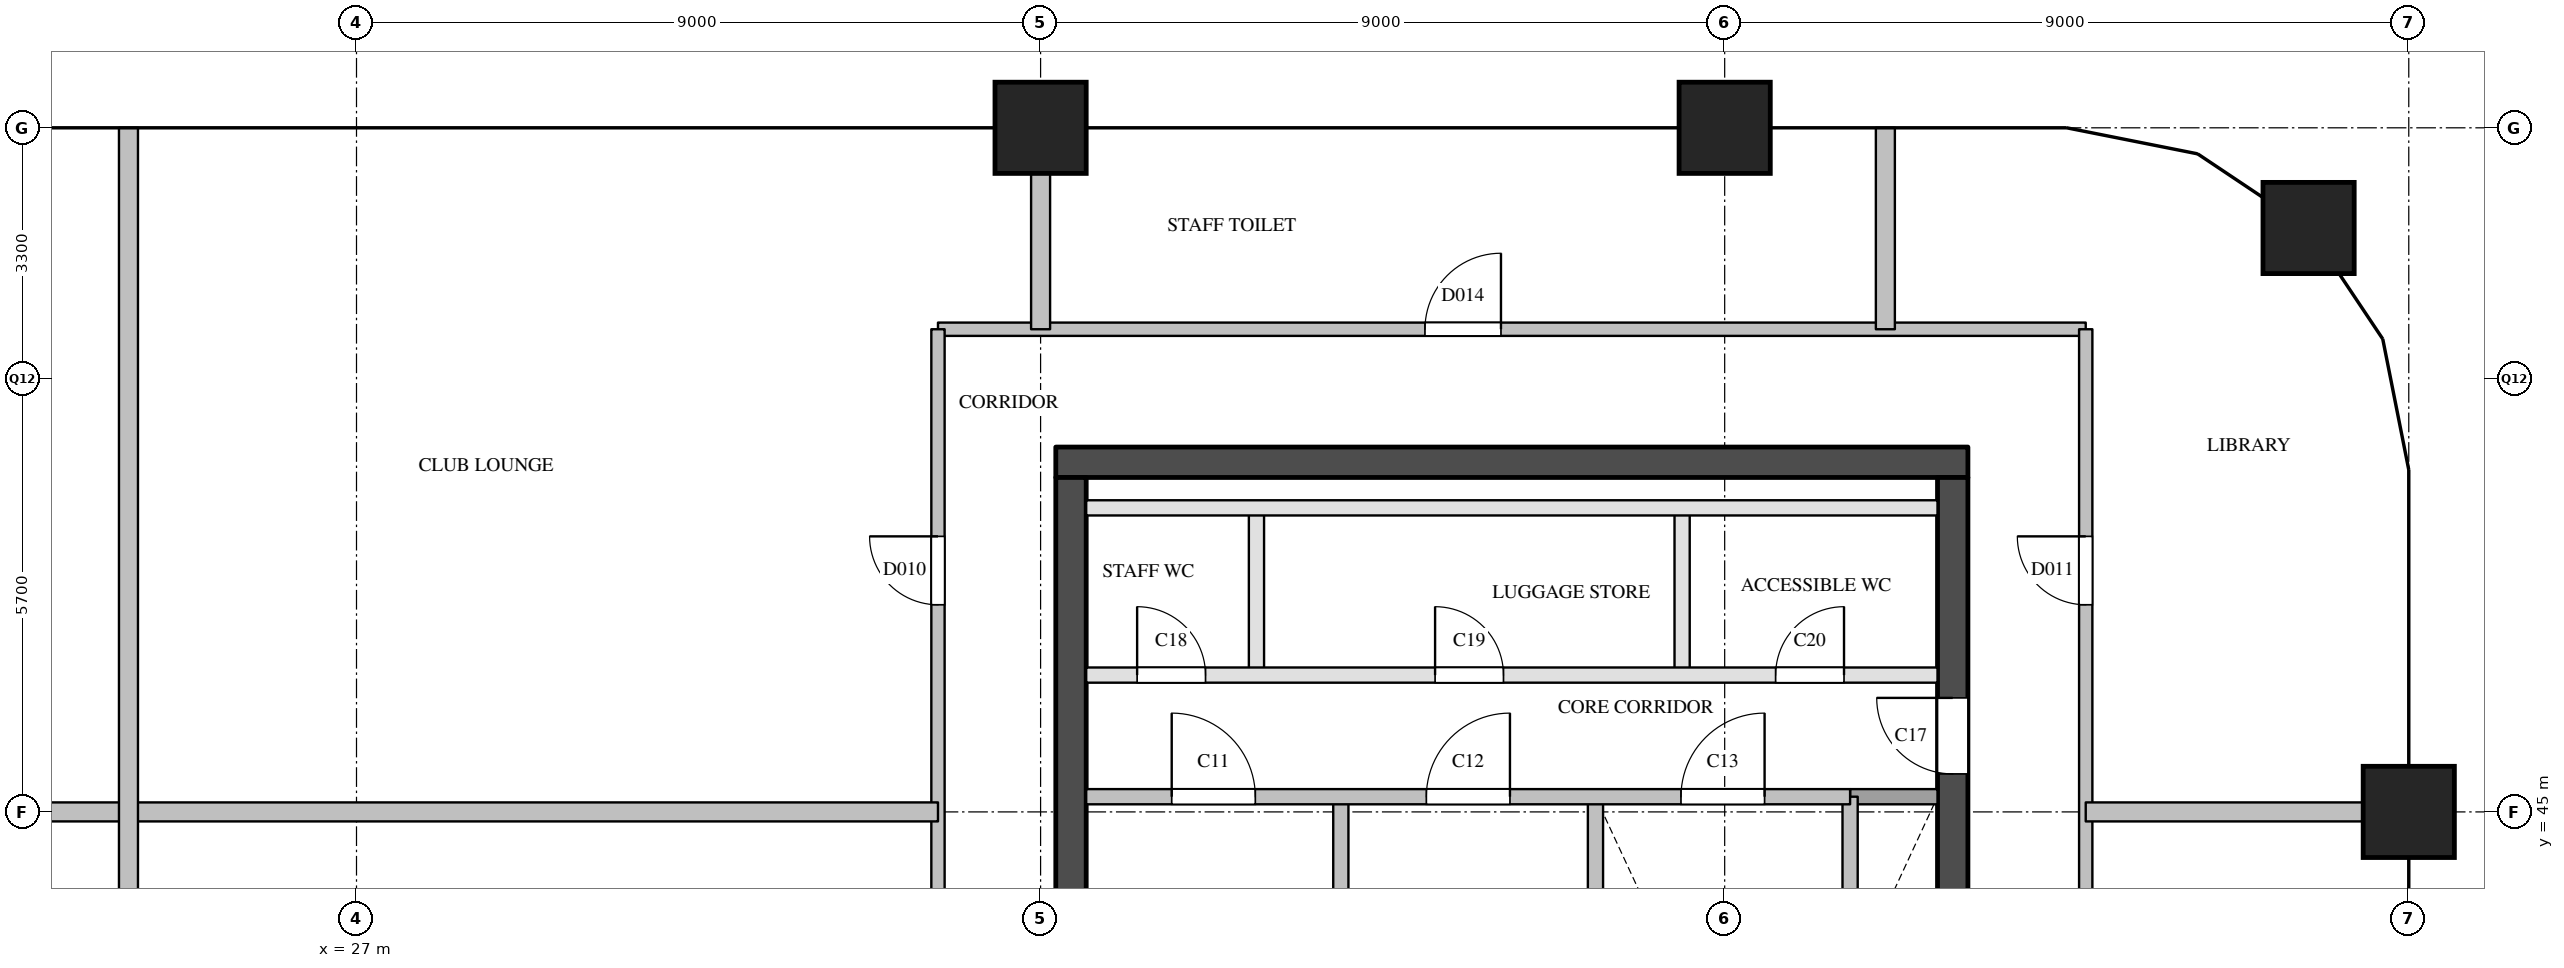
"""IFC4 building model, lengths in metres.
Left out: names, types, materials, properties, quantities, classifications, styles, units other than length and angle.
Written with IfcOpenShell. Run it as: python <this file> out.ifc"""

import sys

from ifc_helpers import new_model, si_unit, direction, frame, frame_2d, origin, origin_2d, place, context, subcontext, project, spatial, rectangle, extrude, element, fill, save


model = new_model("IFC4")
c1 = context("Model", 3, precision=1e-05, world=origin(), true_north=direction((0.0, 1.0)))
c2 = subcontext(c1, "Body", "Model", "MODEL_VIEW")
j1 = project(units=[si_unit("LENGTHUNIT", "METRE"), si_unit("PLANEANGLEUNIT", "RADIAN")], contexts=[c1])
p1 = place(None, origin())
s1 = spatial("IfcSite", under=j1, at=p1, CompositionType="ELEMENT")
p2 = place(p1, origin())
s2 = spatial("IfcBuilding", under=s1, at=p2, CompositionType="ELEMENT")
p3 = place(p2, frame((0.0, 0.0, 226.7)))
s3 = spatial("IfcBuildingStorey", under=s2, at=p3, CompositionType="ELEMENT", Elevation=226.7)
for number, where, z_axis, x_axis in (
    (1, (36.0, 54.0, 0.0), (0.0, 0.0, 1.0), (1.0, 0.0, 0.0)),
    (2, (45.0, 54.0, 0.0), (0.0, 0.0, 1.0), (1.0, 0.0, 0.0)),
    (3, (54.0, 45.0, 0.0), (0.0, 0.0, 1.0), (1.0, 0.0, 0.0)),
    (4, (52.682, 52.682, 0.0), (0.0, 0.0, 1.0), (1.0, 0.0, 0.0)),
):
    element("IfcColumn", number, at=place(p3, frame(where, z_axis=z_axis, x_axis=x_axis)), inside=s3, PredefinedType="COLUMN", context=c2, shape_type="SweptSolid", body=[
        extrude(rectangle(XDim=1.2, YDim=1.2, at=origin_2d()), origin(), (0.0, 0.0, 1.0), 3.9),
    ])
p4 = place(p3, frame((36.2, 49.6, 0.0), z_axis=(0.0, 0.0, 1.0), x_axis=(1.0, 0.0, 0.0)))
e5 = element("IfcWall", 5, at=p4, inside=s3, PredefinedType="SHEAR", context=c2, shape_type="SweptSolid", body=[
    extrude(rectangle(XDim=12.0, YDim=0.4, at=frame_2d((6.0, 0.0))), origin(), (0.0, 0.0, 1.0), 3.5),
])
p5 = place(p3, frame((36.4, 29.1, 0.0), z_axis=(0.0, 0.0, 1.0), x_axis=(0.0, 1.0, 0.0)))
e6 = element("IfcWall", 6, at=p5, inside=s3, PredefinedType="SHEAR", context=c2, shape_type="SweptSolid", body=[
    extrude(rectangle(XDim=20.3, YDim=0.4, at=frame_2d((10.15, 0.0))), origin(), (0.0, 0.0, 1.0), 3.5),
])
p6 = place(p5, frame((3.6, 0.0, 0.0)))
e7 = element("IfcOpeningElement", 7, at=p6, cuts=e6, PredefinedType="OPENING", context=c2, shape_type="SweptSolid", body=[
    extrude(rectangle(XDim=1.8, YDim=2.1, at=frame_2d((0.9, 1.05))), frame((0.0, 0.21, 0.0), z_axis=(0.0, -1.0, 0.0), x_axis=(1.0, 0.0, 0.0)), (0.0, 0.0, 1.0), 0.42),
])
p7 = place(p3, frame((48.0, 29.1, 0.0), z_axis=(0.0, 0.0, 1.0), x_axis=(0.0, 1.0, 0.0)))
e8 = element("IfcWall", 8, at=p7, inside=s3, PredefinedType="SHEAR", context=c2, shape_type="SweptSolid", body=[
    extrude(rectangle(XDim=20.3, YDim=0.4, at=frame_2d((10.15, 0.0))), origin(), (0.0, 0.0, 1.0), 3.5),
])
p8 = place(p7, frame((12.5, 0.0, 0.0)))
e9 = element("IfcOpeningElement", 9, at=p8, cuts=e8, PredefinedType="OPENING", context=c2, shape_type="SweptSolid", body=[
    extrude(rectangle(XDim=0.7, YDim=2.1, at=frame_2d((0.35, 1.05))), frame((0.0, 0.21, 0.0), z_axis=(0.0, -1.0, 0.0), x_axis=(1.0, 0.0, 0.0)), (0.0, 0.0, 1.0), 0.42),
])
p9 = place(p7, frame((3.9, 0.0, 0.0)))
e10 = element("IfcOpeningElement", 10, at=p9, cuts=e8, PredefinedType="OPENING", context=c2, shape_type="SweptSolid", body=[
    extrude(rectangle(XDim=1.8, YDim=2.1, at=frame_2d((0.9, 1.05))), frame((0.0, 0.21, 0.0), z_axis=(0.0, -1.0, 0.0), x_axis=(1.0, 0.0, 0.0)), (0.0, 0.0, 1.0), 0.42),
])
p10 = place(p7, frame((16.4, 0.0, 0.0)))
e11 = element("IfcOpeningElement", 11, at=p10, cuts=e8, PredefinedType="OPENING", context=c2, shape_type="SweptSolid", body=[
    extrude(rectangle(XDim=1.0, YDim=2.1, at=frame_2d((0.5, 1.05))), frame((0.0, 0.21, 0.0), z_axis=(0.0, -1.0, 0.0), x_axis=(1.0, 0.0, 0.0)), (0.0, 0.0, 1.0), 0.42),
])
p11 = place(p3, frame((38.84, 46.8, 0.0), z_axis=(0.0, 0.0, 1.0), x_axis=(0.0, 1.0, 0.0)))
e12 = element("IfcWall", 12, at=p11, inside=s3, PredefinedType="PARTITIONING", context=c2, shape_type="SweptSolid", body=[
    extrude(rectangle(XDim=2.2, YDim=0.2, at=frame_2d((1.1, 0.0))), origin(), (0.0, 0.0, 1.0), 3.5),
])
for number, where, z_axis, x_axis in (
    (13, (39.95, 40.78, 0.0), (0.0, 0.0, 1.0), (0.0, 1.0, 0.0)),
    (14, (43.3, 40.78, 0.0), (0.0, 0.0, 1.0), (0.0, 1.0, 0.0)),
):
    element("IfcWall", number, at=place(p3, frame(where, z_axis=z_axis, x_axis=x_axis)), inside=s3, PredefinedType="SOLIDWALL", context=c2, shape_type="SweptSolid", body=[
        extrude(rectangle(XDim=4.42, YDim=0.2, at=frame_2d((2.21, 0.0))), origin(), (0.0, 0.0, 1.0), 3.5),
    ])
p12 = place(p3, frame((44.44, 46.8, 0.0), z_axis=(0.0, 0.0, 1.0), x_axis=(0.0, 1.0, 0.0)))
e15 = element("IfcWall", 15, at=p12, inside=s3, PredefinedType="PARTITIONING", context=c2, shape_type="SweptSolid", body=[
    extrude(rectangle(XDim=2.2, YDim=0.2, at=frame_2d((1.1, 0.0))), origin(), (0.0, 0.0, 1.0), 3.5),
])
p13 = place(p3, frame((46.65, 40.78, 0.0), z_axis=(0.0, 0.0, 1.0), x_axis=(0.0, 1.0, 0.0)))
e16 = element("IfcWall", 16, at=p13, inside=s3, PredefinedType="SOLIDWALL", context=c2, shape_type="SweptSolid", body=[
    extrude(rectangle(XDim=4.42, YDim=0.2, at=frame_2d((2.21, 0.0))), origin(), (0.0, 0.0, 1.0), 3.5),
])
p14 = place(p3, frame((46.65, 45.2, 0.0), z_axis=(0.0, 0.0, 1.0), x_axis=(1.0, 0.0, 0.0)))
e17 = element("IfcWall", 17, at=p14, inside=s3, PredefinedType="SOLIDWALL", context=c2, shape_type="SweptSolid", body=[
    extrude(rectangle(XDim=1.15, YDim=0.2, at=frame_2d((0.575, 0.0))), origin(), (0.0, 0.0, 1.0), 3.5),
])
p15 = place(p3, frame((36.6, 45.2, 0.0), z_axis=(0.0, 0.0, 1.0), x_axis=(1.0, 0.0, 0.0)))
e18 = element("IfcWall", 18, at=p15, inside=s3, PredefinedType="SOLIDWALL", context=c2, shape_type="SweptSolid", body=[
    extrude(rectangle(XDim=10.05, YDim=0.2, at=frame_2d((5.025, 0.0))), origin(), (0.0, 0.0, 1.0), 3.5),
])
p16 = place(p15, frame((1.125, 0.0, 0.0)))
e19 = element("IfcOpeningElement", 19, at=p16, cuts=e18, PredefinedType="OPENING", context=c2, shape_type="SweptSolid", body=[
    extrude(rectangle(XDim=1.1, YDim=2.1, at=frame_2d((0.55, 1.05))), frame((0.0, 0.11, 0.0), z_axis=(0.0, -1.0, 0.0), x_axis=(1.0, 0.0, 0.0)), (0.0, 0.0, 1.0), 0.22),
])
p17 = place(p15, frame((4.475, 0.0, 0.0)))
e20 = element("IfcOpeningElement", 20, at=p17, cuts=e18, PredefinedType="OPENING", context=c2, shape_type="SweptSolid", body=[
    extrude(rectangle(XDim=1.1, YDim=2.1, at=frame_2d((0.55, 1.05))), frame((0.0, 0.11, 0.0), z_axis=(0.0, -1.0, 0.0), x_axis=(1.0, 0.0, 0.0)), (0.0, 0.0, 1.0), 0.22),
])
p18 = place(p15, frame((7.825, 0.0, 0.0)))
e21 = element("IfcOpeningElement", 21, at=p18, cuts=e18, PredefinedType="OPENING", context=c2, shape_type="SweptSolid", body=[
    extrude(rectangle(XDim=1.1, YDim=2.1, at=frame_2d((0.55, 1.05))), frame((0.0, 0.11, 0.0), z_axis=(0.0, -1.0, 0.0), x_axis=(1.0, 0.0, 0.0)), (0.0, 0.0, 1.0), 0.22),
])
p19 = place(p3, frame((36.6, 46.8, 0.0), z_axis=(0.0, 0.0, 1.0), x_axis=(1.0, 0.0, 0.0)))
e22 = element("IfcWall", 22, at=p19, inside=s3, PredefinedType="PARTITIONING", context=c2, shape_type="SweptSolid", body=[
    extrude(rectangle(XDim=11.2, YDim=0.2, at=frame_2d((5.6, 0.0))), origin(), (0.0, 0.0, 1.0), 3.5),
])
p20 = place(p19, frame((0.67, 0.0, 0.0)))
e23 = element("IfcOpeningElement", 23, at=p20, cuts=e22, PredefinedType="OPENING", context=c2, shape_type="SweptSolid", body=[
    extrude(rectangle(XDim=0.9, YDim=2.1, at=frame_2d((0.45, 1.05))), frame((0.0, 0.11, 0.0), z_axis=(0.0, -1.0, 0.0), x_axis=(1.0, 0.0, 0.0)), (0.0, 0.0, 1.0), 0.22),
])
p21 = place(p19, frame((4.59, 0.0, 0.0)))
e24 = element("IfcOpeningElement", 24, at=p21, cuts=e22, PredefinedType="OPENING", context=c2, shape_type="SweptSolid", body=[
    extrude(rectangle(XDim=0.9, YDim=2.1, at=frame_2d((0.45, 1.05))), frame((0.0, 0.11, 0.0), z_axis=(0.0, -1.0, 0.0), x_axis=(1.0, 0.0, 0.0)), (0.0, 0.0, 1.0), 0.22),
])
p22 = place(p19, frame((9.07, 0.0, 0.0)))
e25 = element("IfcOpeningElement", 25, at=p22, cuts=e22, PredefinedType="OPENING", context=c2, shape_type="SweptSolid", body=[
    extrude(rectangle(XDim=0.9, YDim=2.1, at=frame_2d((0.45, 1.05))), frame((0.0, 0.11, 0.0), z_axis=(0.0, -1.0, 0.0), x_axis=(1.0, 0.0, 0.0)), (0.0, 0.0, 1.0), 0.22),
])
p23 = place(p3, frame((36.6, 49.0, 0.0), z_axis=(0.0, 0.0, 1.0), x_axis=(1.0, 0.0, 0.0)))
e26 = element("IfcWall", 26, at=p23, inside=s3, PredefinedType="PARTITIONING", context=c2, shape_type="SweptSolid", body=[
    extrude(rectangle(XDim=11.2, YDim=0.2, at=frame_2d((5.6, 0.0))), origin(), (0.0, 0.0, 1.0), 3.5),
])
p24 = place(p3, frame((34.65, 51.35, 0.0), z_axis=(0.0, 0.0, 1.0), x_axis=(1.0, 0.0, 0.0)))
e27 = element("IfcWall", 27, at=p24, inside=s3, PredefinedType="PARTITIONING", context=c2, shape_type="SweptSolid", body=[
    extrude(rectangle(XDim=15.1, YDim=0.175, at=frame_2d((7.55, 0.0))), origin(), (0.0, 0.0, 1.0), 3.5),
])
p25 = place(p24, frame((6.407, 0.0, 0.0)))
e28 = element("IfcOpeningElement", 28, at=p25, cuts=e27, PredefinedType="OPENING", context=c2, shape_type="SweptSolid", body=[
    extrude(rectangle(XDim=1.0, YDim=2.1, at=frame_2d((0.5, 1.05))), frame((0.0, 0.097, 0.0), z_axis=(0.0, -1.0, 0.0), x_axis=(1.0, 0.0, 0.0)), (0.0, 0.0, 1.0), 0.195),
])
p26 = place(p3, frame((34.65, 28.5, 0.0), z_axis=(0.0, 0.0, 1.0), x_axis=(0.0, 1.0, 0.0)))
e29 = element("IfcWall", 29, at=p26, inside=s3, PredefinedType="PARTITIONING", context=c2, shape_type="SweptSolid", body=[
    extrude(rectangle(XDim=22.85, YDim=0.175, at=frame_2d((11.425, 0.0))), origin(), (0.0, 0.0, 1.0), 3.5),
])
p27 = place(p26, frame((3.3, 0.0, 0.0)))
e30 = element("IfcOpeningElement", 30, at=p27, cuts=e29, PredefinedType="OPENING", context=c2, shape_type="SweptSolid", body=[
    extrude(rectangle(XDim=0.9, YDim=2.1, at=frame_2d((0.45, 1.05))), frame((0.0, 0.097, 0.0), z_axis=(0.0, -1.0, 0.0), x_axis=(1.0, 0.0, 0.0)), (0.0, 0.0, 1.0), 0.195),
])
p28 = place(p26, frame((11.5, 0.0, 0.0)))
e31 = element("IfcOpeningElement", 31, at=p28, cuts=e29, PredefinedType="OPENING", context=c2, shape_type="SweptSolid", body=[
    extrude(rectangle(XDim=1.0, YDim=2.1, at=frame_2d((0.5, 1.05))), frame((0.0, 0.097, 0.0), z_axis=(0.0, -1.0, 0.0), x_axis=(1.0, 0.0, 0.0)), (0.0, 0.0, 1.0), 0.195),
])
p29 = place(p26, frame((19.225, 0.0, 0.0)))
e32 = element("IfcOpeningElement", 32, at=p29, cuts=e29, PredefinedType="OPENING", context=c2, shape_type="SweptSolid", body=[
    extrude(rectangle(XDim=0.9, YDim=2.1, at=frame_2d((0.45, 1.05))), frame((0.0, 0.097, 0.0), z_axis=(0.0, -1.0, 0.0), x_axis=(1.0, 0.0, 0.0)), (0.0, 0.0, 1.0), 0.195),
])
p30 = place(p3, frame((49.75, 28.5, 0.0), z_axis=(0.0, 0.0, 1.0), x_axis=(0.0, 1.0, 0.0)))
e33 = element("IfcWall", 33, at=p30, inside=s3, PredefinedType="PARTITIONING", context=c2, shape_type="SweptSolid", body=[
    extrude(rectangle(XDim=22.85, YDim=0.175, at=frame_2d((11.425, 0.0))), origin(), (0.0, 0.0, 1.0), 3.5),
])
p31 = place(p30, frame((3.3, 0.0, 0.0)))
e34 = element("IfcOpeningElement", 34, at=p31, cuts=e33, PredefinedType="OPENING", context=c2, shape_type="SweptSolid", body=[
    extrude(rectangle(XDim=0.9, YDim=2.1, at=frame_2d((0.45, 1.05))), frame((0.0, 0.097, 0.0), z_axis=(0.0, -1.0, 0.0), x_axis=(1.0, 0.0, 0.0)), (0.0, 0.0, 1.0), 0.195),
])
p32 = place(p30, frame((11.55, 0.0, 0.0)))
e35 = element("IfcOpeningElement", 35, at=p32, cuts=e33, PredefinedType="OPENING", context=c2, shape_type="SweptSolid", body=[
    extrude(rectangle(XDim=0.9, YDim=2.1, at=frame_2d((0.45, 1.05))), frame((0.0, 0.097, 0.0), z_axis=(0.0, -1.0, 0.0), x_axis=(1.0, 0.0, 0.0)), (0.0, 0.0, 1.0), 0.195),
])
p33 = place(p30, frame((19.225, 0.0, 0.0)))
e36 = element("IfcOpeningElement", 36, at=p33, cuts=e33, PredefinedType="OPENING", context=c2, shape_type="SweptSolid", body=[
    extrude(rectangle(XDim=0.9, YDim=2.1, at=frame_2d((0.45, 1.05))), frame((0.0, 0.097, 0.0), z_axis=(0.0, -1.0, 0.0), x_axis=(1.0, 0.0, 0.0)), (0.0, 0.0, 1.0), 0.195),
])
p34 = place(p3, frame((19.35, 45.0, 0.0), z_axis=(0.0, 0.0, 1.0), x_axis=(1.0, 0.0, 0.0)))
e37 = element("IfcWall", 37, at=p34, inside=s3, PredefinedType="PARTITIONING", context=c2, shape_type="SweptSolid", body=[
    extrude(rectangle(XDim=15.3, YDim=0.25, at=frame_2d((7.65, 0.0))), origin(), (0.0, 0.0, 1.0), 3.5),
])
p35 = place(p3, frame((49.75, 45.0, 0.0), z_axis=(0.0, 0.0, 1.0), x_axis=(1.0, 0.0, 0.0)))
e38 = element("IfcWall", 38, at=p35, inside=s3, PredefinedType="PARTITIONING", context=c2, shape_type="SweptSolid", body=[
    extrude(rectangle(XDim=4.25, YDim=0.25, at=frame_2d((2.125, 0.0))), origin(), (0.0, 0.0, 1.0), 3.5),
])
p36 = place(p3, frame((24.0, 27.0, 0.0), z_axis=(0.0, 0.0, 1.0), x_axis=(0.0, 1.0, 0.0)))
e39 = element("IfcWall", 39, at=p36, inside=s3, PredefinedType="PARTITIONING", context=c2, shape_type="SweptSolid", body=[
    extrude(rectangle(XDim=27.0, YDim=0.25, at=frame_2d((13.5, 0.0))), origin(), (0.0, 0.0, 1.0), 3.5),
])
p37 = place(p3, frame((36.0, 51.35, 0.0), z_axis=(0.0, 0.0, 1.0), x_axis=(0.0, 1.0, 0.0)))
e40 = element("IfcWall", 40, at=p37, inside=s3, PredefinedType="PARTITIONING", context=c2, shape_type="SweptSolid", body=[
    extrude(rectangle(XDim=2.65, YDim=0.25, at=frame_2d((1.325, 0.0))), origin(), (0.0, 0.0, 1.0), 3.5),
])
p38 = place(p3, frame((47.114, 51.35, 0.0), z_axis=(0.0, 0.0, 1.0), x_axis=(0.0, 1.0, 0.0)))
e41 = element("IfcWall", 41, at=p38, inside=s3, PredefinedType="PARTITIONING", context=c2, shape_type="SweptSolid", body=[
    extrude(rectangle(XDim=2.65, YDim=0.25, at=frame_2d((1.325, 0.0))), origin(), (0.0, 0.0, 1.0), 2.5),
])
p39 = place(p16, origin())
e42 = element("IfcDoor", 42, at=p39, inside=s3, OperationType="SINGLE_SWING_LEFT", PredefinedType="DOOR", context=c2, shape_type="SweptSolid", body=[
    extrude(rectangle(XDim=1.1, YDim=2.1, at=frame_2d((0.55, 1.05))), frame((0.0, 0.025, 0.0), z_axis=(0.0, -1.0, 0.0), x_axis=(1.0, 0.0, 0.0)), (0.0, 0.0, 1.0), 0.05),
])
fill(e19, e42)
p40 = place(p17, origin())
e43 = element("IfcDoor", 43, at=p40, inside=s3, OperationType="SINGLE_SWING_RIGHT", PredefinedType="DOOR", context=c2, shape_type="SweptSolid", body=[
    extrude(rectangle(XDim=1.1, YDim=2.1, at=frame_2d((0.55, 1.05))), frame((0.0, 0.025, 0.0), z_axis=(0.0, -1.0, 0.0), x_axis=(1.0, 0.0, 0.0)), (0.0, 0.0, 1.0), 0.05),
])
fill(e20, e43)
p41 = place(p18, origin())
e44 = element("IfcDoor", 44, at=p41, inside=s3, OperationType="SINGLE_SWING_RIGHT", PredefinedType="DOOR", context=c2, shape_type="SweptSolid", body=[
    extrude(rectangle(XDim=1.1, YDim=2.1, at=frame_2d((0.55, 1.05))), frame((0.0, 0.025, 0.0), z_axis=(0.0, -1.0, 0.0), x_axis=(1.0, 0.0, 0.0)), (0.0, 0.0, 1.0), 0.05),
])
fill(e21, e44)
p42 = place(p10, origin())
e45 = element("IfcDoor", 45, at=p42, inside=s3, OperationType="SINGLE_SWING_RIGHT", PredefinedType="DOOR", context=c2, shape_type="SweptSolid", body=[
    extrude(rectangle(XDim=1.0, YDim=2.1, at=frame_2d((0.5, 1.05))), frame((0.0, 0.025, 0.0), z_axis=(0.0, -1.0, 0.0), x_axis=(1.0, 0.0, 0.0)), (0.0, 0.0, 1.0), 0.05),
])
fill(e11, e45)
p43 = place(p20, origin())
e46 = element("IfcDoor", 46, at=p43, inside=s3, OperationType="SINGLE_SWING_LEFT", PredefinedType="DOOR", context=c2, shape_type="SweptSolid", body=[
    extrude(rectangle(XDim=0.9, YDim=2.1, at=frame_2d((0.45, 1.05))), frame((0.0, 0.025, 0.0), z_axis=(0.0, -1.0, 0.0), x_axis=(1.0, 0.0, 0.0)), (0.0, 0.0, 1.0), 0.05),
])
fill(e23, e46)
p44 = place(p21, origin())
e47 = element("IfcDoor", 47, at=p44, inside=s3, OperationType="SINGLE_SWING_LEFT", PredefinedType="DOOR", context=c2, shape_type="SweptSolid", body=[
    extrude(rectangle(XDim=0.9, YDim=2.1, at=frame_2d((0.45, 1.05))), frame((0.0, 0.025, 0.0), z_axis=(0.0, -1.0, 0.0), x_axis=(1.0, 0.0, 0.0)), (0.0, 0.0, 1.0), 0.05),
])
fill(e24, e47)
p45 = place(p22, origin())
e48 = element("IfcDoor", 48, at=p45, inside=s3, OperationType="SINGLE_SWING_RIGHT", PredefinedType="DOOR", context=c2, shape_type="SweptSolid", body=[
    extrude(rectangle(XDim=0.9, YDim=2.1, at=frame_2d((0.45, 1.05))), frame((0.0, 0.025, 0.0), z_axis=(0.0, -1.0, 0.0), x_axis=(1.0, 0.0, 0.0)), (0.0, 0.0, 1.0), 0.05),
])
fill(e25, e48)
p46 = place(p29, origin())
e49 = element("IfcDoor", 49, at=p46, inside=s3, OperationType="SINGLE_SWING_RIGHT", PredefinedType="DOOR", context=c2, shape_type="SweptSolid", body=[
    extrude(rectangle(XDim=0.9, YDim=2.1, at=frame_2d((0.45, 1.05))), frame((0.0, 0.025, 0.0), z_axis=(0.0, -1.0, 0.0), x_axis=(1.0, 0.0, 0.0)), (0.0, 0.0, 1.0), 0.05),
])
fill(e32, e49)
p47 = place(p33, origin())
e50 = element("IfcDoor", 50, at=p47, inside=s3, OperationType="SINGLE_SWING_RIGHT", PredefinedType="DOOR", context=c2, shape_type="SweptSolid", body=[
    extrude(rectangle(XDim=0.9, YDim=2.1, at=frame_2d((0.45, 1.05))), frame((0.0, 0.025, 0.0), z_axis=(0.0, -1.0, 0.0), x_axis=(1.0, 0.0, 0.0)), (0.0, 0.0, 1.0), 0.05),
])
fill(e36, e50)
p48 = place(p25, origin())
e51 = element("IfcDoor", 51, at=p48, inside=s3, OperationType="SINGLE_SWING_RIGHT", PredefinedType="DOOR", context=c2, shape_type="SweptSolid", body=[
    extrude(rectangle(XDim=1.0, YDim=2.1, at=frame_2d((0.5, 1.05))), frame((0.0, 0.025, 0.0), z_axis=(0.0, -1.0, 0.0), x_axis=(1.0, 0.0, 0.0)), (0.0, 0.0, 1.0), 0.05),
])
fill(e28, e51)
save(model, sys.argv[1])
